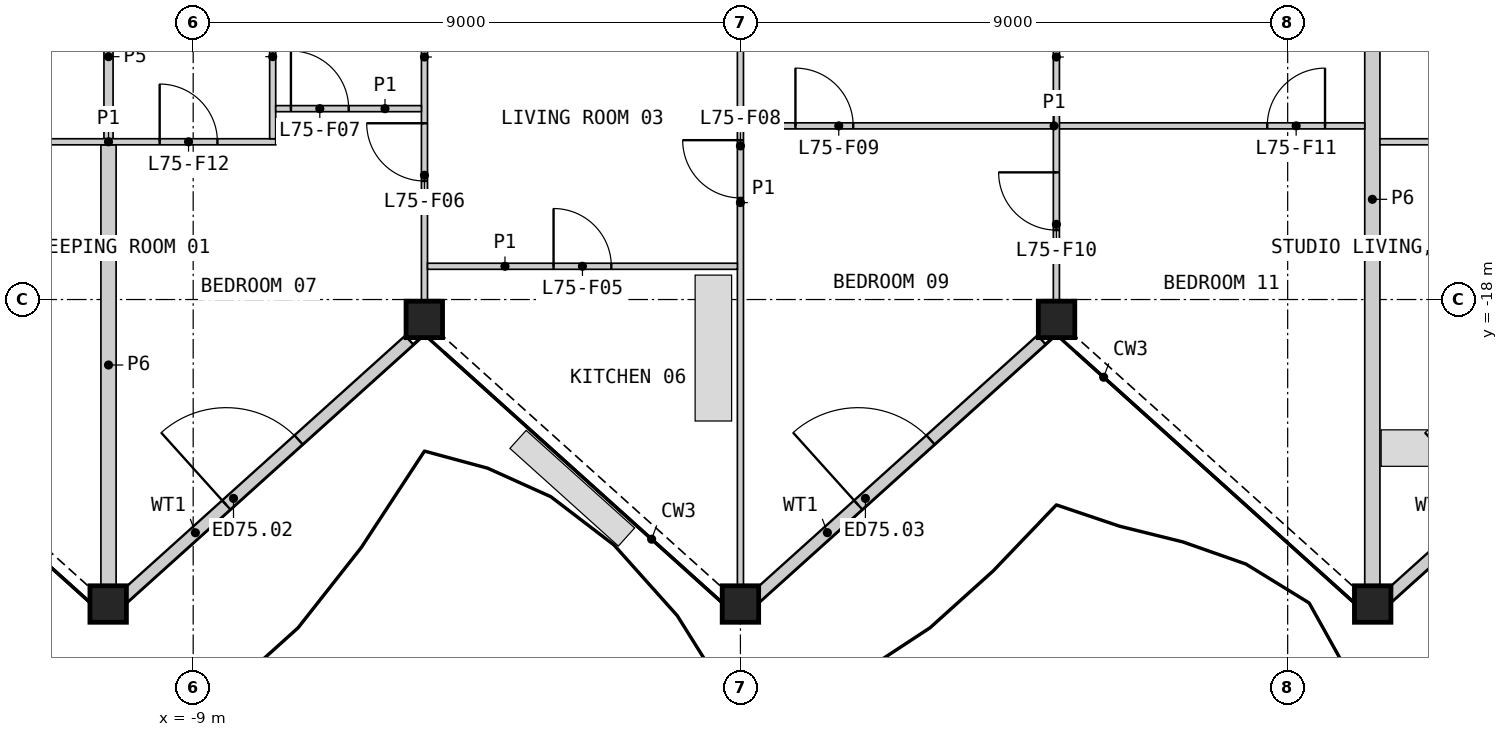
"""IFC4 building model, lengths in metres.
Left out: names, types, materials, properties, quantities, classifications, styles, units other than length and angle.
Written with IfcOpenShell. Run it as: python <this file> out.ifc"""

import sys

from ifc_helpers import new_model, si_unit, direction, frame, frame_2d, origin, origin_2d, place, context, subcontext, project, spatial, rectangle, hollow_rectangle, extrude, element, fill, save


model = new_model("IFC4")
c1 = context("Model", 3, precision=1e-05, world=origin(), true_north=direction((0.0, 1.0)))
c2 = subcontext(c1, "Body", "Model", "MODEL_VIEW")
j1 = project(units=[si_unit("LENGTHUNIT", "METRE"), si_unit("PLANEANGLEUNIT", "RADIAN")], contexts=[c1])
p1 = place(None, origin())
s1 = spatial("IfcSite", under=j1, at=p1, CompositionType="ELEMENT")
p2 = place(p1, origin())
s2 = spatial("IfcBuilding", under=s1, at=p2, CompositionType="ELEMENT")
p3 = place(p2, frame((0.0, 0.0, 335.8)))
s3 = spatial("IfcBuildingStorey", under=s2, at=p3, CompositionType="ELEMENT", Elevation=335.8)
for number, where, z_axis, x_axis in (
    (1, (-10.398, -23.008, 0.0), (0.0, 0.0, 1.0), (1.0, 0.0, 0.0)),
    (2, (-5.199, -18.327, 0.0), (0.0, 0.0, 1.0), (1.0, 0.0, 0.0)),
    (3, (0.0, -23.008, 0.0), (0.0, 0.0, 1.0), (1.0, 0.0, 0.0)),
    (4, (5.199, -18.327, 0.0), (0.0, 0.0, 1.0), (1.0, 0.0, 0.0)),
    (5, (10.398, -23.008, 0.0), (0.0, 0.0, 1.0), (1.0, 0.0, 0.0)),
):
    element("IfcColumn", number, at=place(p3, frame(where, z_axis=z_axis, x_axis=x_axis)), inside=s3, PredefinedType="COLUMN", context=c2, shape_type="SweptSolid", body=[
        extrude(hollow_rectangle(XDim=0.6, YDim=0.6, WallThickness=0.04, at=origin_2d()), origin(), (0.0, 0.0, 1.0), 3.4),
    ])
p4 = place(p3, frame((-10.137, -22.892, 0.0), z_axis=(0.0, 0.0, 1.0), x_axis=(0.743147981531, 0.669127101189, 0.0)))
e6 = element("IfcWall", 6, at=p4, inside=s3, PredefinedType="SOLIDWALL", context=c2, shape_type="SweptSolid", body=[
    extrude(rectangle(XDim=6.313, YDim=0.2, at=frame_2d((3.156, 0.0))), origin(), (0.0, 0.0, 1.0), 2.488),
])
p5 = place(p4, frame((2.262, 0.0, 0.0)))
e7 = element("IfcOpeningElement", 7, at=p5, cuts=e6, PredefinedType="OPENING", context=c2, shape_type="SweptSolid", body=[
    extrude(rectangle(XDim=1.6, YDim=2.25, at=frame_2d((0.8, 1.125))), frame((0.0, 0.11, 0.0), z_axis=(0.0, -1.0, 0.0), x_axis=(1.0, 0.0, 0.0)), (0.0, 0.0, 1.0), 0.22),
])
p6 = place(p3, frame((0.256, -22.892, 0.0), z_axis=(0.0, 0.0, 1.0), x_axis=(0.743142393944, 0.66913330684, 0.0)))
e8 = element("IfcWall", 8, at=p6, inside=s3, PredefinedType="SOLIDWALL", context=c2, shape_type="SweptSolid", body=[
    extrude(rectangle(XDim=6.321, YDim=0.2, at=frame_2d((3.16, 0.0))), origin(), (0.0, 0.0, 1.0), 2.488),
])
p7 = place(p6, frame((2.262, 0.0, 0.0)))
e9 = element("IfcOpeningElement", 9, at=p7, cuts=e8, PredefinedType="OPENING", context=c2, shape_type="SweptSolid", body=[
    extrude(rectangle(XDim=1.6, YDim=2.25, at=frame_2d((0.8, 1.125))), frame((0.0, 0.11, 0.0), z_axis=(0.0, -1.0, 0.0), x_axis=(1.0, 0.0, 0.0)), (0.0, 0.0, 1.0), 0.22),
])
p8 = place(p3, frame((10.648, -22.892, 0.0), z_axis=(0.0, 0.0, 1.0), x_axis=(0.743136819733, 0.669139497532, 0.0)))
e10 = element("IfcWall", 10, at=p8, inside=s3, PredefinedType="SOLIDWALL", context=c2, shape_type="SweptSolid", body=[
    extrude(rectangle(XDim=6.328, YDim=0.2, at=frame_2d((3.164, 0.0))), origin(), (0.0, 0.0, 1.0), 2.488),
])
p9 = place(p8, frame((2.262, 0.0, 0.0)))
e11 = element("IfcOpeningElement", 11, at=p9, cuts=e10, PredefinedType="OPENING", context=c2, shape_type="SweptSolid", body=[
    extrude(rectangle(XDim=1.6, YDim=2.25, at=frame_2d((0.8, 1.125))), frame((0.0, 0.11, 0.0), z_axis=(0.0, -1.0, 0.0), x_axis=(1.0, 0.0, 0.0)), (0.0, 0.0, 1.0), 0.22),
])
p10 = place(p3, frame((10.393, -22.698, 0.0), z_axis=(0.0, 0.0, 1.0), x_axis=(0.0, 1.0, 0.0)))
e12 = element("IfcWall", 12, at=p10, inside=s3, PredefinedType="PARTITIONING", context=c2, shape_type="SweptSolid", body=[
    extrude(rectangle(XDim=12.692, YDim=0.25, at=frame_2d((6.346, 0.0))), origin(), (0.0, 0.0, 1.0), 2.33),
])
p11 = place(p3, frame((-10.393, -22.698, 0.0), z_axis=(0.0, 0.0, 1.0), x_axis=(0.0, 1.0, 0.0)))
e13 = element("IfcWall", 13, at=p11, inside=s3, PredefinedType="PARTITIONING", context=c2, shape_type="SweptSolid", body=[
    extrude(rectangle(XDim=7.242, YDim=0.25, at=frame_2d((3.621, 0.0))), origin(), (0.0, 0.0, 1.0), 2.33),
])
p12 = place(p3, frame((-10.393, -15.356, 0.0), z_axis=(0.0, 0.0, 1.0), x_axis=(0.0, 1.0, 0.0)))
e14 = element("IfcWall", 14, at=p12, inside=s3, PredefinedType="PLUMBINGWALL", context=c2, shape_type="SweptSolid", body=[
    extrude(rectangle(XDim=2.7, YDim=0.15, at=frame_2d((1.35, 0.0))), origin(), (0.0, 0.0, 1.0), 2.33),
])
p13 = place(p3, frame((0.0, -22.698, 0.0), z_axis=(0.0, 0.0, 1.0), x_axis=(0.0, 1.0, 0.0)))
e15 = element("IfcWall", 15, at=p13, inside=s3, PredefinedType="PARTITIONING", context=c2, shape_type="SweptSolid", body=[
    extrude(rectangle(XDim=12.585, YDim=0.1, at=frame_2d((6.292, 0.0))), origin(), (0.0, 0.0, 1.0), 2.33),
])
p14 = place(p13, frame((6.369, 0.0, 0.0)))
e16 = element("IfcOpeningElement", 16, at=p14, cuts=e15, PredefinedType="OPENING", context=c2, shape_type="SweptSolid", body=[
    extrude(rectangle(XDim=0.95, YDim=2.1, at=frame_2d((0.475, 1.05))), frame((0.0, 0.06, 0.0), z_axis=(0.0, -1.0, 0.0), x_axis=(1.0, 0.0, 0.0)), (0.0, 0.0, 1.0), 0.12),
])
p15 = place(p3, frame((0.05, -15.144, 0.0), z_axis=(0.0, 0.0, 1.0), x_axis=(1.0, 0.0, 0.0)))
e17 = element("IfcWall", 17, at=p15, inside=s3, PredefinedType="PARTITIONING", context=c2, shape_type="SweptSolid", body=[
    extrude(rectangle(XDim=10.218, YDim=0.1, at=frame_2d((5.109, 0.0))), origin(), (0.0, 0.0, 1.0), 2.33),
])
p16 = place(p15, frame((0.855, 0.0, 0.0)))
e18 = element("IfcOpeningElement", 18, at=p16, cuts=e17, PredefinedType="OPENING", context=c2, shape_type="SweptSolid", body=[
    extrude(rectangle(XDim=0.95, YDim=2.1, at=frame_2d((0.475, 1.05))), frame((0.0, 0.06, 0.0), z_axis=(0.0, -1.0, 0.0), x_axis=(1.0, 0.0, 0.0)), (0.0, 0.0, 1.0), 0.12),
])
p17 = place(p15, frame((8.615, 0.0, 0.0)))
e19 = element("IfcOpeningElement", 19, at=p17, cuts=e17, PredefinedType="OPENING", context=c2, shape_type="SweptSolid", body=[
    extrude(rectangle(XDim=0.95, YDim=2.1, at=frame_2d((0.475, 1.05))), frame((0.0, 0.06, 0.0), z_axis=(0.0, -1.0, 0.0), x_axis=(1.0, 0.0, 0.0)), (0.0, 0.0, 1.0), 0.12),
])
p18 = place(p3, frame((-5.196, -18.017, 0.0), z_axis=(0.0, 0.0, 1.0), x_axis=(0.0, 1.0, 0.0)))
e20 = element("IfcWall", 20, at=p18, inside=s3, PredefinedType="PARTITIONING", context=c2, shape_type="SweptSolid", body=[
    extrude(rectangle(XDim=8.011, YDim=0.1, at=frame_2d((4.006, 0.0))), origin(), (0.0, 0.0, 1.0), 2.33),
])
p19 = place(p18, frame((1.966, 0.0, 0.0)))
e21 = element("IfcOpeningElement", 21, at=p19, cuts=e20, PredefinedType="OPENING", context=c2, shape_type="SweptSolid", body=[
    extrude(rectangle(XDim=0.95, YDim=2.1, at=frame_2d((0.475, 1.05))), frame((0.0, 0.06, 0.0), z_axis=(0.0, -1.0, 0.0), x_axis=(1.0, 0.0, 0.0)), (0.0, 0.0, 1.0), 0.12),
])
p20 = place(p3, frame((5.196, -18.017, 0.0), z_axis=(0.0, 0.0, 1.0), x_axis=(0.0, 1.0, 0.0)))
e22 = element("IfcWall", 22, at=p20, inside=s3, PredefinedType="PARTITIONING", context=c2, shape_type="SweptSolid", body=[
    extrude(rectangle(XDim=8.011, YDim=0.1, at=frame_2d((4.006, 0.0))), origin(), (0.0, 0.0, 1.0), 2.33),
])
p21 = place(p20, frame((1.158, 0.0, 0.0)))
e23 = element("IfcOpeningElement", 23, at=p21, cuts=e22, PredefinedType="OPENING", context=c2, shape_type="SweptSolid", body=[
    extrude(rectangle(XDim=0.95, YDim=2.1, at=frame_2d((0.475, 1.05))), frame((0.0, 0.06, 0.0), z_axis=(0.0, -1.0, 0.0), x_axis=(1.0, 0.0, 0.0)), (0.0, 0.0, 1.0), 0.12),
])
p22 = place(p3, frame((-13.143, -15.406, 0.0), z_axis=(0.0, 0.0, 1.0), x_axis=(1.0, 0.0, 0.0)))
e24 = element("IfcWall", 24, at=p22, inside=s3, PredefinedType="PARTITIONING", context=c2, shape_type="SweptSolid", body=[
    extrude(rectangle(XDim=5.5, YDim=0.1, at=frame_2d((2.75, 0.0))), origin(), (0.0, 0.0, 1.0), 2.33),
])
p23 = place(p22, frame((0.25, 0.0, 0.0)))
e25 = element("IfcOpeningElement", 25, at=p23, cuts=e24, PredefinedType="OPENING", context=c2, shape_type="SweptSolid", body=[
    extrude(rectangle(XDim=0.95, YDim=2.1, at=frame_2d((0.475, 1.05))), frame((0.0, 0.06, 0.0), z_axis=(0.0, -1.0, 0.0), x_axis=(1.0, 0.0, 0.0)), (0.0, 0.0, 1.0), 0.12),
])
p24 = place(p22, frame((3.591, 0.0, 0.0)))
e26 = element("IfcOpeningElement", 26, at=p24, cuts=e24, PredefinedType="OPENING", context=c2, shape_type="SweptSolid", body=[
    extrude(rectangle(XDim=0.95, YDim=2.1, at=frame_2d((0.475, 1.05))), frame((0.0, 0.06, 0.0), z_axis=(0.0, -1.0, 0.0), x_axis=(1.0, 0.0, 0.0)), (0.0, 0.0, 1.0), 0.12),
])
p25 = place(p3, frame((-5.146, -17.453, 0.0), z_axis=(0.0, 0.0, 1.0), x_axis=(1.0, 0.0, 0.0)))
e27 = element("IfcWall", 27, at=p25, inside=s3, PredefinedType="PARTITIONING", context=c2, shape_type="SweptSolid", body=[
    extrude(rectangle(XDim=5.096, YDim=0.1, at=frame_2d((2.548, 0.0))), origin(), (0.0, 0.0, 1.0), 2.33),
])
p26 = place(p25, frame((2.073, 0.0, 0.0)))
e28 = element("IfcOpeningElement", 28, at=p26, cuts=e27, PredefinedType="OPENING", context=c2, shape_type="SweptSolid", body=[
    extrude(rectangle(XDim=0.95, YDim=2.1, at=frame_2d((0.475, 1.05))), frame((0.0, 0.06, 0.0), z_axis=(0.0, -1.0, 0.0), x_axis=(1.0, 0.0, 0.0)), (0.0, 0.0, 1.0), 0.12),
])
p27 = place(p3, frame((-7.692, -15.356, 0.0), z_axis=(0.0, 0.0, 1.0), x_axis=(0.0, 1.0, 0.0)))
e29 = element("IfcWall", 29, at=p27, inside=s3, PredefinedType="PARTITIONING", context=c2, shape_type="SweptSolid", body=[
    extrude(rectangle(XDim=2.7, YDim=0.1, at=frame_2d((1.35, 0.0))), origin(), (0.0, 0.0, 1.0), 2.33),
])
p28 = place(p3, frame((10.518, -15.406, 0.0), z_axis=(0.0, 0.0, 1.0), x_axis=(1.0, 0.0, 0.0)))
e30 = element("IfcWall", 30, at=p28, inside=s3, PredefinedType="PARTITIONING", context=c2, shape_type="SweptSolid", body=[
    extrude(rectangle(XDim=2.525, YDim=0.1, at=frame_2d((1.262, 0.0))), origin(), (0.0, 0.0, 1.0), 2.33),
])
p29 = place(p28, frame((1.325, 0.0, 0.0)))
e31 = element("IfcOpeningElement", 31, at=p29, cuts=e30, PredefinedType="OPENING", context=c2, shape_type="SweptSolid", body=[
    extrude(rectangle(XDim=0.95, YDim=2.1, at=frame_2d((0.475, 1.05))), frame((0.0, 0.06, 0.0), z_axis=(0.0, -1.0, 0.0), x_axis=(1.0, 0.0, 0.0)), (0.0, 0.0, 1.0), 0.12),
])
p30 = place(p3, frame((-7.643, -14.861, 0.0), z_axis=(0.0, 0.0, 1.0), x_axis=(1.0, 0.0, 0.0)))
e32 = element("IfcWall", 32, at=p30, inside=s3, PredefinedType="PARTITIONING", context=c2, shape_type="SweptSolid", body=[
    extrude(rectangle(XDim=2.396, YDim=0.1, at=frame_2d((1.198, 0.0))), origin(), (0.0, 0.0, 1.0), 2.33),
])
p31 = place(p30, frame((0.25, 0.0, 0.0)))
e33 = element("IfcOpeningElement", 33, at=p31, cuts=e32, PredefinedType="OPENING", context=c2, shape_type="SweptSolid", body=[
    extrude(rectangle(XDim=0.95, YDim=2.1, at=frame_2d((0.475, 1.05))), frame((0.0, 0.06, 0.0), z_axis=(0.0, -1.0, 0.0), x_axis=(1.0, 0.0, 0.0)), (0.0, 0.0, 1.0), 0.12),
])
p32 = place(p5, origin())
e34 = element("IfcDoor", 34, at=p32, inside=s3, OperationType="DOUBLE_DOOR_SINGLE_SWING", PredefinedType="DOOR", context=c2, shape_type="SweptSolid", body=[
    extrude(rectangle(XDim=1.6, YDim=2.25, at=frame_2d((0.8, 1.125))), frame((0.0, 0.025, 0.0), z_axis=(0.0, -1.0, 0.0), x_axis=(1.0, 0.0, 0.0)), (0.0, 0.0, 1.0), 0.05),
])
fill(e7, e34)
p33 = place(p7, origin())
e35 = element("IfcDoor", 35, at=p33, inside=s3, OperationType="DOUBLE_DOOR_SINGLE_SWING", PredefinedType="DOOR", context=c2, shape_type="SweptSolid", body=[
    extrude(rectangle(XDim=1.6, YDim=2.25, at=frame_2d((0.8, 1.125))), frame((0.0, 0.025, 0.0), z_axis=(0.0, -1.0, 0.0), x_axis=(1.0, 0.0, 0.0)), (0.0, 0.0, 1.0), 0.05),
])
fill(e9, e35)
p34 = place(p26, origin())
e36 = element("IfcDoor", 36, at=p34, inside=s3, OperationType="SINGLE_SWING_LEFT", PredefinedType="DOOR", context=c2, shape_type="SweptSolid", body=[
    extrude(rectangle(XDim=0.95, YDim=2.1, at=frame_2d((0.475, 1.05))), frame((0.0, 0.025, 0.0), z_axis=(0.0, -1.0, 0.0), x_axis=(1.0, 0.0, 0.0)), (0.0, 0.0, 1.0), 0.05),
])
fill(e28, e36)
p35 = place(p19, origin())
e37 = element("IfcDoor", 37, at=p35, inside=s3, OperationType="SINGLE_SWING_RIGHT", PredefinedType="DOOR", context=c2, shape_type="SweptSolid", body=[
    extrude(rectangle(XDim=0.95, YDim=2.1, at=frame_2d((0.475, 1.05))), frame((0.0, 0.025, 0.0), z_axis=(0.0, -1.0, 0.0), x_axis=(1.0, 0.0, 0.0)), (0.0, 0.0, 1.0), 0.05),
])
fill(e21, e37)
p36 = place(p31, origin())
e38 = element("IfcDoor", 38, at=p36, inside=s3, OperationType="SINGLE_SWING_LEFT", PredefinedType="DOOR", context=c2, shape_type="SweptSolid", body=[
    extrude(rectangle(XDim=0.95, YDim=2.1, at=frame_2d((0.475, 1.05))), frame((0.0, 0.025, 0.0), z_axis=(0.0, -1.0, 0.0), x_axis=(1.0, 0.0, 0.0)), (0.0, 0.0, 1.0), 0.05),
])
fill(e33, e38)
p37 = place(p14, origin())
e39 = element("IfcDoor", 39, at=p37, inside=s3, OperationType="SINGLE_SWING_RIGHT", PredefinedType="DOOR", context=c2, shape_type="SweptSolid", body=[
    extrude(rectangle(XDim=0.95, YDim=2.1, at=frame_2d((0.475, 1.05))), frame((0.0, 0.025, 0.0), z_axis=(0.0, -1.0, 0.0), x_axis=(1.0, 0.0, 0.0)), (0.0, 0.0, 1.0), 0.05),
])
fill(e16, e39)
p38 = place(p16, origin())
e40 = element("IfcDoor", 40, at=p38, inside=s3, OperationType="SINGLE_SWING_LEFT", PredefinedType="DOOR", context=c2, shape_type="SweptSolid", body=[
    extrude(rectangle(XDim=0.95, YDim=2.1, at=frame_2d((0.475, 1.05))), frame((0.0, 0.025, 0.0), z_axis=(0.0, -1.0, 0.0), x_axis=(1.0, 0.0, 0.0)), (0.0, 0.0, 1.0), 0.05),
])
fill(e18, e40)
p39 = place(p21, origin())
e41 = element("IfcDoor", 41, at=p39, inside=s3, OperationType="SINGLE_SWING_RIGHT", PredefinedType="DOOR", context=c2, shape_type="SweptSolid", body=[
    extrude(rectangle(XDim=0.95, YDim=2.1, at=frame_2d((0.475, 1.05))), frame((0.0, 0.025, 0.0), z_axis=(0.0, -1.0, 0.0), x_axis=(1.0, 0.0, 0.0)), (0.0, 0.0, 1.0), 0.05),
])
fill(e23, e41)
p40 = place(p17, origin())
e42 = element("IfcDoor", 42, at=p40, inside=s3, OperationType="SINGLE_SWING_RIGHT", PredefinedType="DOOR", context=c2, shape_type="SweptSolid", body=[
    extrude(rectangle(XDim=0.95, YDim=2.1, at=frame_2d((0.475, 1.05))), frame((0.0, 0.025, 0.0), z_axis=(0.0, -1.0, 0.0), x_axis=(1.0, 0.0, 0.0)), (0.0, 0.0, 1.0), 0.05),
])
fill(e19, e42)
p41 = place(p24, origin())
e43 = element("IfcDoor", 43, at=p41, inside=s3, OperationType="SINGLE_SWING_LEFT", PredefinedType="DOOR", context=c2, shape_type="SweptSolid", body=[
    extrude(rectangle(XDim=0.95, YDim=2.1, at=frame_2d((0.475, 1.05))), frame((0.0, 0.025, 0.0), z_axis=(0.0, -1.0, 0.0), x_axis=(1.0, 0.0, 0.0)), (0.0, 0.0, 1.0), 0.05),
])
fill(e26, e43)
save(model, sys.argv[1])
